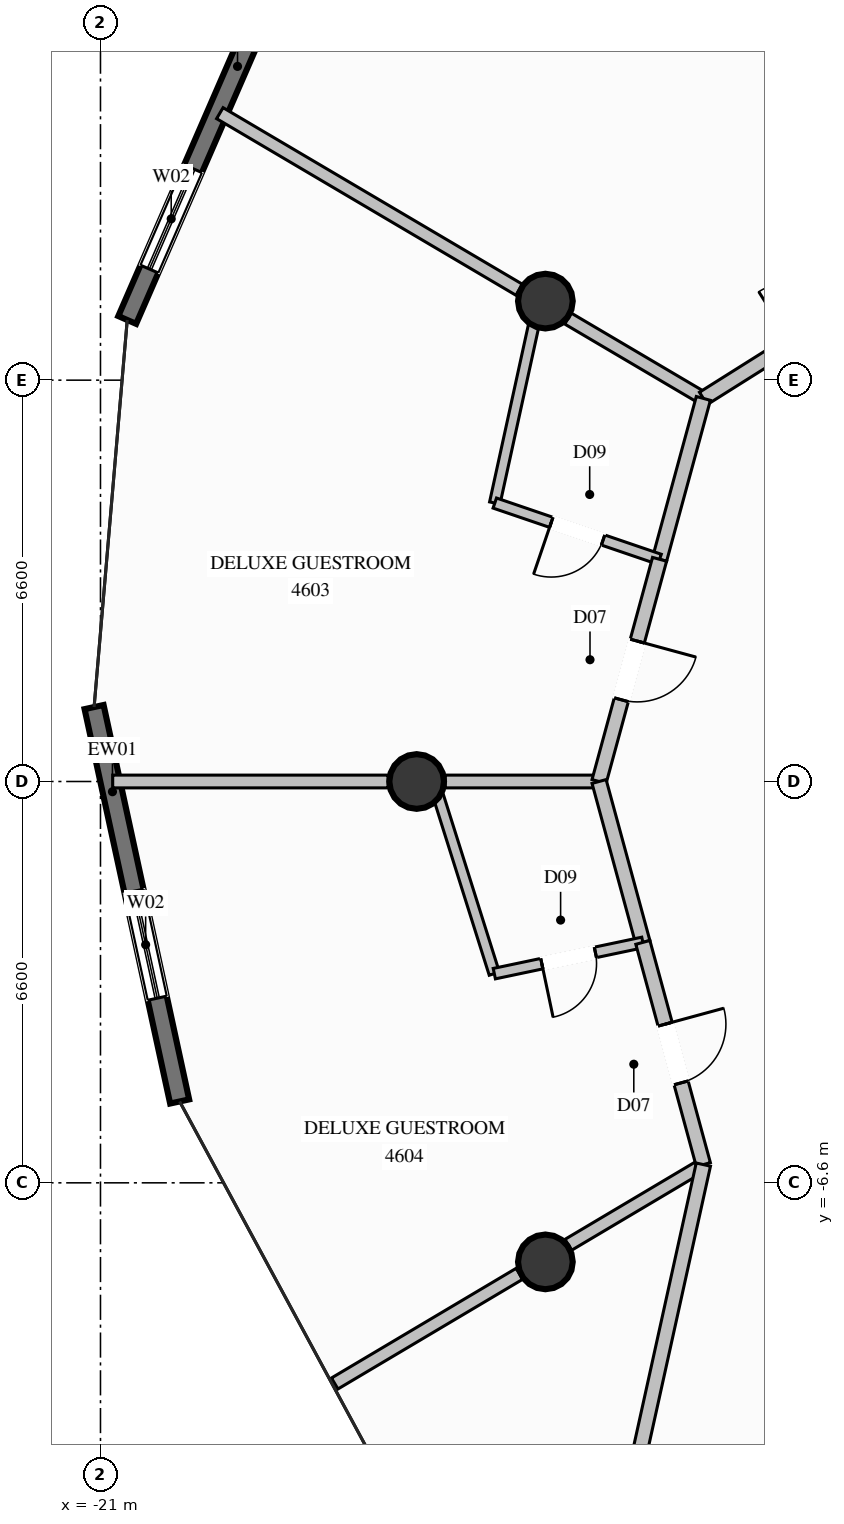
"""IFC4 building model, lengths in metres.
Left out: names, types, materials, properties, quantities, classifications, styles, units other than length and angle.
Written with IfcOpenShell. Run it as: python <this file> out.ifc"""

import sys

from ifc_helpers import new_model, si_unit, direction, frame, frame_2d, origin, origin_2d, place, context, subcontext, project, spatial, rectangle, circle, extrude, element, fill, save


model = new_model("IFC4")
c1 = context("Model", 3, precision=1e-05, world=origin(), true_north=direction((0.0, 1.0)))
c2 = subcontext(c1, "Body", "Model", "MODEL_VIEW")
j1 = project(units=[si_unit("LENGTHUNIT", "METRE"), si_unit("PLANEANGLEUNIT", "RADIAN")], contexts=[c1])
p1 = place(None, origin())
s1 = spatial("IfcSite", under=j1, at=p1, CompositionType="ELEMENT")
p2 = place(p1, origin())
s2 = spatial("IfcBuilding", under=s1, at=p2, CompositionType="ELEMENT")
p3 = place(p2, frame((0.0, 0.0, 173.2)))
s3 = spatial("IfcBuildingStorey", under=s2, at=p3, CompositionType="ELEMENT", Elevation=173.2)
for number, where, z_axis, x_axis in (
    (1, (-13.683, 7.9, 0.0), (0.0, 0.0, 1.0), (1.0, 0.0, 0.0)),
    (2, (-15.8, 0.0, 0.0), (0.0, 0.0, 1.0), (1.0, 0.0, 0.0)),
    (3, (-13.683, -7.9, 0.0), (0.0, 0.0, 1.0), (1.0, 0.0, 0.0)),
):
    element("IfcColumn", number, at=place(p3, frame(where, z_axis=z_axis, x_axis=x_axis)), inside=s3, PredefinedType="COLUMN", context=c2, shape_type="SweptSolid", body=[
        extrude(circle(Radius=0.45, at=origin_2d()), origin(), (0.0, 0.0, 1.0), 3.6),
    ])
p4 = place(p3, frame((-20.56, 7.59, 0.0), z_axis=(0.0, 0.0, 1.0), x_axis=(0.398911001453, 0.916989647117, 0.0)))
e4 = element("IfcWall", 4, at=p4, inside=s3, PredefinedType="SOLIDWALL", context=c2, shape_type="SweptSolid", body=[
    extrude(rectangle(XDim=6.132, YDim=0.32, at=frame_2d((3.066, 0.0))), origin(), (0.0, 0.0, 1.0), 3.36),
])
p5 = place(p4, frame((0.913, 0.0, 0.35)))
e5 = element("IfcOpeningElement", 5, at=p5, cuts=e4, PredefinedType="OPENING", context=c2, shape_type="SweptSolid", body=[
    extrude(rectangle(XDim=1.8, YDim=2.6, at=frame_2d((0.9, 1.3))), frame((0.0, 0.17, 0.0), z_axis=(0.0, -1.0, 0.0), x_axis=(1.0, 0.0, 0.0)), (0.0, 0.0, 1.0), 0.34),
])
p6 = place(p3, frame((-19.698, -5.262, 0.0), z_axis=(0.0, 0.0, 1.0), x_axis=(-0.211992849193, 0.977271217161, 0.0)))
e6 = element("IfcWall", 6, at=p6, inside=s3, PredefinedType="SOLIDWALL", context=c2, shape_type="SweptSolid", body=[
    extrude(rectangle(XDim=6.637, YDim=0.32, at=frame_2d((3.318, 0.0))), origin(), (0.0, 0.0, 1.0), 3.36),
])
p7 = place(p6, frame((1.738, 0.0, 0.35)))
e7 = element("IfcOpeningElement", 7, at=p7, cuts=e6, PredefinedType="OPENING", context=c2, shape_type="SweptSolid", body=[
    extrude(rectangle(XDim=1.8, YDim=2.6, at=frame_2d((0.9, 1.3))), frame((0.0, 0.17, 0.0), z_axis=(0.0, -1.0, 0.0), x_axis=(1.0, 0.0, 0.0)), (0.0, 0.0, 1.0), 0.34),
])
p8 = place(p3, frame((-11.085, 6.3, 0.0), z_axis=(0.0, 0.0, 1.0), x_axis=(-0.86133622593, 0.508035339225, 0.0)))
e8 = element("IfcWall", 8, at=p8, inside=s3, PredefinedType="PARTITIONING", context=c2, shape_type="SweptSolid", body=[
    extrude(rectangle(XDim=2.584, YDim=0.21, at=frame_2d((1.292, 0.0))), origin(), (0.0, 0.0, 1.0), 2.801),
])
p9 = place(p3, frame((-14.114, 8.087, 0.0), z_axis=(0.0, 0.0, 1.0), x_axis=(-0.861313184314, 0.50807440255, 0.0)))
e9 = element("IfcWall", 9, at=p9, inside=s3, PredefinedType="PARTITIONING", context=c2, shape_type="SweptSolid", body=[
    extrude(rectangle(XDim=5.716, YDim=0.21, at=frame_2d((2.858, 0.0))), origin(), (0.0, 0.0, 1.0), 3.36),
])
p10 = place(p3, frame((-12.8, 0.0, 0.0), z_axis=(0.0, 0.0, 1.0), x_axis=(-1.0, 0.0, 0.0)))
e10 = element("IfcWall", 10, at=p10, inside=s3, PredefinedType="PARTITIONING", context=c2, shape_type="SweptSolid", body=[
    extrude(rectangle(XDim=2.53, YDim=0.21, at=frame_2d((1.265, 0.0))), origin(), (0.0, 0.0, 1.0), 3.36),
])
p11 = place(p3, frame((-16.27, 0.0, 0.0), z_axis=(0.0, 0.0, 1.0), x_axis=(-1.0, 0.0, 0.0)))
e11 = element("IfcWall", 11, at=p11, inside=s3, PredefinedType="PARTITIONING", context=c2, shape_type="SweptSolid", body=[
    extrude(rectangle(XDim=4.529, YDim=0.21, at=frame_2d((2.265, 0.0))), origin(), (0.0, 0.0, 1.0), 3.36),
])
p12 = place(p3, frame((-11.085, -6.3, 0.0), z_axis=(0.0, 0.0, 1.0), x_axis=(-0.859827513331, -0.510584613281, 0.0)))
e12 = element("IfcWall", 12, at=p12, inside=s3, PredefinedType="PARTITIONING", context=c2, shape_type="SweptSolid", body=[
    extrude(rectangle(XDim=2.583, YDim=0.21, at=frame_2d((1.292, 0.0))), origin(), (0.0, 0.0, 1.0), 2.801),
])
p13 = place(p3, frame((-14.11, -8.096, 0.0), z_axis=(0.0, 0.0, 1.0), x_axis=(-0.859825355727, -0.510588246682, 0.0)))
e13 = element("IfcWall", 13, at=p13, inside=s3, PredefinedType="PARTITIONING", context=c2, shape_type="SweptSolid", body=[
    extrude(rectangle(XDim=3.533, YDim=0.21, at=frame_2d((1.767, 0.0))), origin(), (0.0, 0.0, 1.0), 3.36),
])
p14 = place(p3, frame((-3.528, 8.65, 0.0), z_axis=(0.0, 0.0, 1.0), x_axis=(-0.554428653403, 0.832231258898, 0.0)))
e14 = element("IfcWall", 14, at=p14, inside=s3, PredefinedType="PARTITIONING", context=c2, shape_type="SweptSolid", body=[
    extrude(rectangle(XDim=12.658, YDim=0.21, at=frame_2d((6.329, 0.0))), origin(), (0.0, 0.0, 1.0), 3.36),
])
p15 = place(p3, frame((-11.085, 6.3, 0.0), z_axis=(0.0, 0.0, 1.0), x_axis=(0.846409267484, 0.532532958526, 0.0)))
e15 = element("IfcWall", 15, at=p15, inside=s3, PredefinedType="PARTITIONING", context=c2, shape_type="SweptSolid", body=[
    extrude(rectangle(XDim=4.413, YDim=0.24, at=frame_2d((2.206, 0.0))), origin(), (0.0, 0.0, 1.0), 3.36),
])
p16 = place(p15, frame((1.706, 0.0, 0.0)))
e16 = element("IfcOpeningElement", 16, at=p16, cuts=e15, PredefinedType="OPENING", context=c2, shape_type="SweptSolid", body=[
    extrude(rectangle(XDim=1.0, YDim=2.2, at=frame_2d((0.5, 1.1))), frame((0.0, 0.13, 0.0), z_axis=(0.0, -1.0, 0.0), x_axis=(1.0, 0.0, 0.0)), (0.0, 0.0, 1.0), 0.26),
])
p17 = place(p3, frame((-11.085, 6.3, 0.0), z_axis=(0.0, 0.0, 1.0), x_axis=(-0.262552356383, -0.964917747872, 0.0)))
e17 = element("IfcWall", 17, at=p17, inside=s3, PredefinedType="PARTITIONING", context=c2, shape_type="SweptSolid", body=[
    extrude(rectangle(XDim=2.742, YDim=0.24, at=frame_2d((1.371, 0.0))), origin(), (0.0, 0.0, 1.0), 3.36),
])
p18 = place(p3, frame((-13.789, 7.895, 0.0), z_axis=(0.0, 0.0, 1.0), x_axis=(-0.213829865727, -0.976870917022, 0.0)))
e18 = element("IfcWall", 18, at=p18, inside=s3, PredefinedType="PLUMBINGWALL", context=c2, shape_type="SweptSolid", body=[
    extrude(rectangle(XDim=3.395, YDim=0.175, at=frame_2d((1.697, 0.0))), origin(), (0.0, 0.0, 1.0), 2.929),
])
p19 = place(p3, frame((-11.805, 3.654, 0.0), z_axis=(0.0, 0.0, 1.0), x_axis=(-0.946382283588, 0.323048871398, 0.0)))
e19 = element("IfcWall", 19, at=p19, inside=s3, PredefinedType="PLUMBINGWALL", context=c2, shape_type="SweptSolid", body=[
    extrude(rectangle(XDim=2.864, YDim=0.175, at=frame_2d((1.432, 0.0))), origin(), (0.0, 0.0, 1.0), 3.36),
])
p20 = place(p19, frame((0.982, 0.0, 0.0)))
e20 = element("IfcOpeningElement", 20, at=p20, cuts=e19, PredefinedType="OPENING", context=c2, shape_type="SweptSolid", body=[
    extrude(rectangle(XDim=0.9, YDim=2.1, at=frame_2d((0.45, 1.05))), frame((0.0, 0.098, 0.0), z_axis=(0.0, -1.0, 0.0), x_axis=(1.0, 0.0, 0.0)), (0.0, 0.0, 1.0), 0.195),
])
p21 = place(p3, frame((-11.805, 3.654, 0.0), z_axis=(0.0, 0.0, 1.0), x_axis=(-0.262762825819, -0.964860454868, 0.0)))
e21 = element("IfcWall", 21, at=p21, inside=s3, PredefinedType="PARTITIONING", context=c2, shape_type="SweptSolid", body=[
    extrude(rectangle(XDim=3.787, YDim=0.24, at=frame_2d((1.894, 0.0))), origin(), (0.0, 0.0, 1.0), 3.36),
])
p22 = place(p21, frame((1.394, 0.0, 0.0)))
e22 = element("IfcOpeningElement", 22, at=p22, cuts=e21, PredefinedType="OPENING", context=c2, shape_type="SweptSolid", body=[
    extrude(rectangle(XDim=1.0, YDim=2.2, at=frame_2d((0.5, 1.1))), frame((0.0, 0.13, 0.0), z_axis=(0.0, -1.0, 0.0), x_axis=(1.0, 0.0, 0.0)), (0.0, 0.0, 1.0), 0.26),
])
p23 = place(p3, frame((-12.8, 0.0, 0.0), z_axis=(0.0, 0.0, 1.0), x_axis=(0.262552356383, -0.964917747872, 0.0)))
e23 = element("IfcWall", 23, at=p23, inside=s3, PredefinedType="PARTITIONING", context=c2, shape_type="SweptSolid", body=[
    extrude(rectangle(XDim=2.742, YDim=0.24, at=frame_2d((1.371, 0.0))), origin(), (0.0, 0.0, 1.0), 3.36),
])
p24 = place(p3, frame((-15.52, 0.0, 0.0), z_axis=(0.0, 0.0, 1.0), x_axis=(0.300912730095, -0.953651681101, 0.0)))
e24 = element("IfcWall", 24, at=p24, inside=s3, PredefinedType="PLUMBINGWALL", context=c2, shape_type="SweptSolid", body=[
    extrude(rectangle(XDim=3.313, YDim=0.175, at=frame_2d((1.657, 0.0))), origin(), (0.0, 0.0, 1.0), 2.929),
])
p25 = place(p3, frame((-12.08, -2.646, 0.0), z_axis=(0.0, 0.0, 1.0), x_axis=(-0.978579866642, -0.205867541403, 0.0)))
e25 = element("IfcWall", 25, at=p25, inside=s3, PredefinedType="PLUMBINGWALL", context=c2, shape_type="SweptSolid", body=[
    extrude(rectangle(XDim=2.496, YDim=0.175, at=frame_2d((1.248, 0.0))), origin(), (0.0, 0.0, 1.0), 3.36),
])
p26 = place(p25, frame((0.798, 0.0, 0.0)))
e26 = element("IfcOpeningElement", 26, at=p26, cuts=e25, PredefinedType="OPENING", context=c2, shape_type="SweptSolid", body=[
    extrude(rectangle(XDim=0.9, YDim=2.1, at=frame_2d((0.45, 1.05))), frame((0.0, 0.098, 0.0), z_axis=(0.0, -1.0, 0.0), x_axis=(1.0, 0.0, 0.0)), (0.0, 0.0, 1.0), 0.195),
])
p27 = place(p3, frame((-12.08, -2.646, 0.0), z_axis=(0.0, 0.0, 1.0), x_axis=(0.262762825819, -0.964860454868, 0.0)))
e27 = element("IfcWall", 27, at=p27, inside=s3, PredefinedType="PARTITIONING", context=c2, shape_type="SweptSolid", body=[
    extrude(rectangle(XDim=3.787, YDim=0.24, at=frame_2d((1.894, 0.0))), origin(), (0.0, 0.0, 1.0), 3.36),
])
p28 = place(p27, frame((1.394, 0.0, 0.0)))
e28 = element("IfcOpeningElement", 28, at=p28, cuts=e27, PredefinedType="OPENING", context=c2, shape_type="SweptSolid", body=[
    extrude(rectangle(XDim=1.0, YDim=2.2, at=frame_2d((0.5, 1.1))), frame((0.0, 0.13, 0.0), z_axis=(0.0, -1.0, 0.0), x_axis=(1.0, 0.0, 0.0)), (0.0, 0.0, 1.0), 0.26),
])
p29 = place(p3, frame((-11.085, -6.3, 0.0), z_axis=(0.0, 0.0, 1.0), x_axis=(-0.21572328796, -0.976454537104, 0.0)))
e29 = element("IfcWall", 29, at=p29, inside=s3, PredefinedType="PARTITIONING", context=c2, shape_type="SweptSolid", body=[
    extrude(rectangle(XDim=5.633, YDim=0.24, at=frame_2d((2.816, 0.0))), origin(), (0.0, 0.0, 1.0), 3.36),
])
p30 = place(p5, origin())
e30 = element("IfcWindow", 30, at=p30, inside=s3, PartitioningType="SINGLE_PANEL", PredefinedType="WINDOW", context=c2, shape_type="SweptSolid", body=[
    extrude(rectangle(XDim=1.8, YDim=2.6, at=frame_2d((0.9, 1.3))), frame((0.0, 0.03, 0.0), z_axis=(0.0, -1.0, 0.0), x_axis=(1.0, 0.0, 0.0)), (0.0, 0.0, 1.0), 0.06),
])
fill(e5, e30)
p31 = place(p7, origin())
e31 = element("IfcWindow", 31, at=p31, inside=s3, PartitioningType="SINGLE_PANEL", PredefinedType="WINDOW", context=c2, shape_type="SweptSolid", body=[
    extrude(rectangle(XDim=1.8, YDim=2.6, at=frame_2d((0.9, 1.3))), frame((0.0, 0.03, 0.0), z_axis=(0.0, -1.0, 0.0), x_axis=(1.0, 0.0, 0.0)), (0.0, 0.0, 1.0), 0.06),
])
fill(e7, e31)
p32 = place(p20, origin())
e32 = element("IfcDoor", 32, at=p32, inside=s3, OperationType="SINGLE_SWING_RIGHT", PredefinedType="DOOR", context=c2, shape_type="SweptSolid", body=[
    extrude(rectangle(XDim=0.9, YDim=2.1, at=frame_2d((0.45, 1.05))), frame((0.0, 0.025, 0.0), z_axis=(0.0, -1.0, 0.0), x_axis=(1.0, 0.0, 0.0)), (0.0, 0.0, 1.0), 0.05),
])
fill(e20, e32)
p33 = place(p22, origin())
e33 = element("IfcDoor", 33, at=p33, inside=s3, OperationType="SINGLE_SWING_LEFT", PredefinedType="DOOR", context=c2, shape_type="SweptSolid", body=[
    extrude(rectangle(XDim=1.0, YDim=2.2, at=frame_2d((0.5, 1.1))), frame((0.0, 0.025, 0.0), z_axis=(0.0, -1.0, 0.0), x_axis=(1.0, 0.0, 0.0)), (0.0, 0.0, 1.0), 0.05),
])
fill(e22, e33)
p34 = place(p26, origin())
e34 = element("IfcDoor", 34, at=p34, inside=s3, OperationType="SINGLE_SWING_RIGHT", PredefinedType="DOOR", context=c2, shape_type="SweptSolid", body=[
    extrude(rectangle(XDim=0.9, YDim=2.1, at=frame_2d((0.45, 1.05))), frame((0.0, 0.025, 0.0), z_axis=(0.0, -1.0, 0.0), x_axis=(1.0, 0.0, 0.0)), (0.0, 0.0, 1.0), 0.05),
])
fill(e26, e34)
p35 = place(p28, origin())
e35 = element("IfcDoor", 35, at=p35, inside=s3, OperationType="SINGLE_SWING_LEFT", PredefinedType="DOOR", context=c2, shape_type="SweptSolid", body=[
    extrude(rectangle(XDim=1.0, YDim=2.2, at=frame_2d((0.5, 1.1))), frame((0.0, 0.025, 0.0), z_axis=(0.0, -1.0, 0.0), x_axis=(1.0, 0.0, 0.0)), (0.0, 0.0, 1.0), 0.05),
])
fill(e28, e35)
save(model, sys.argv[1])
